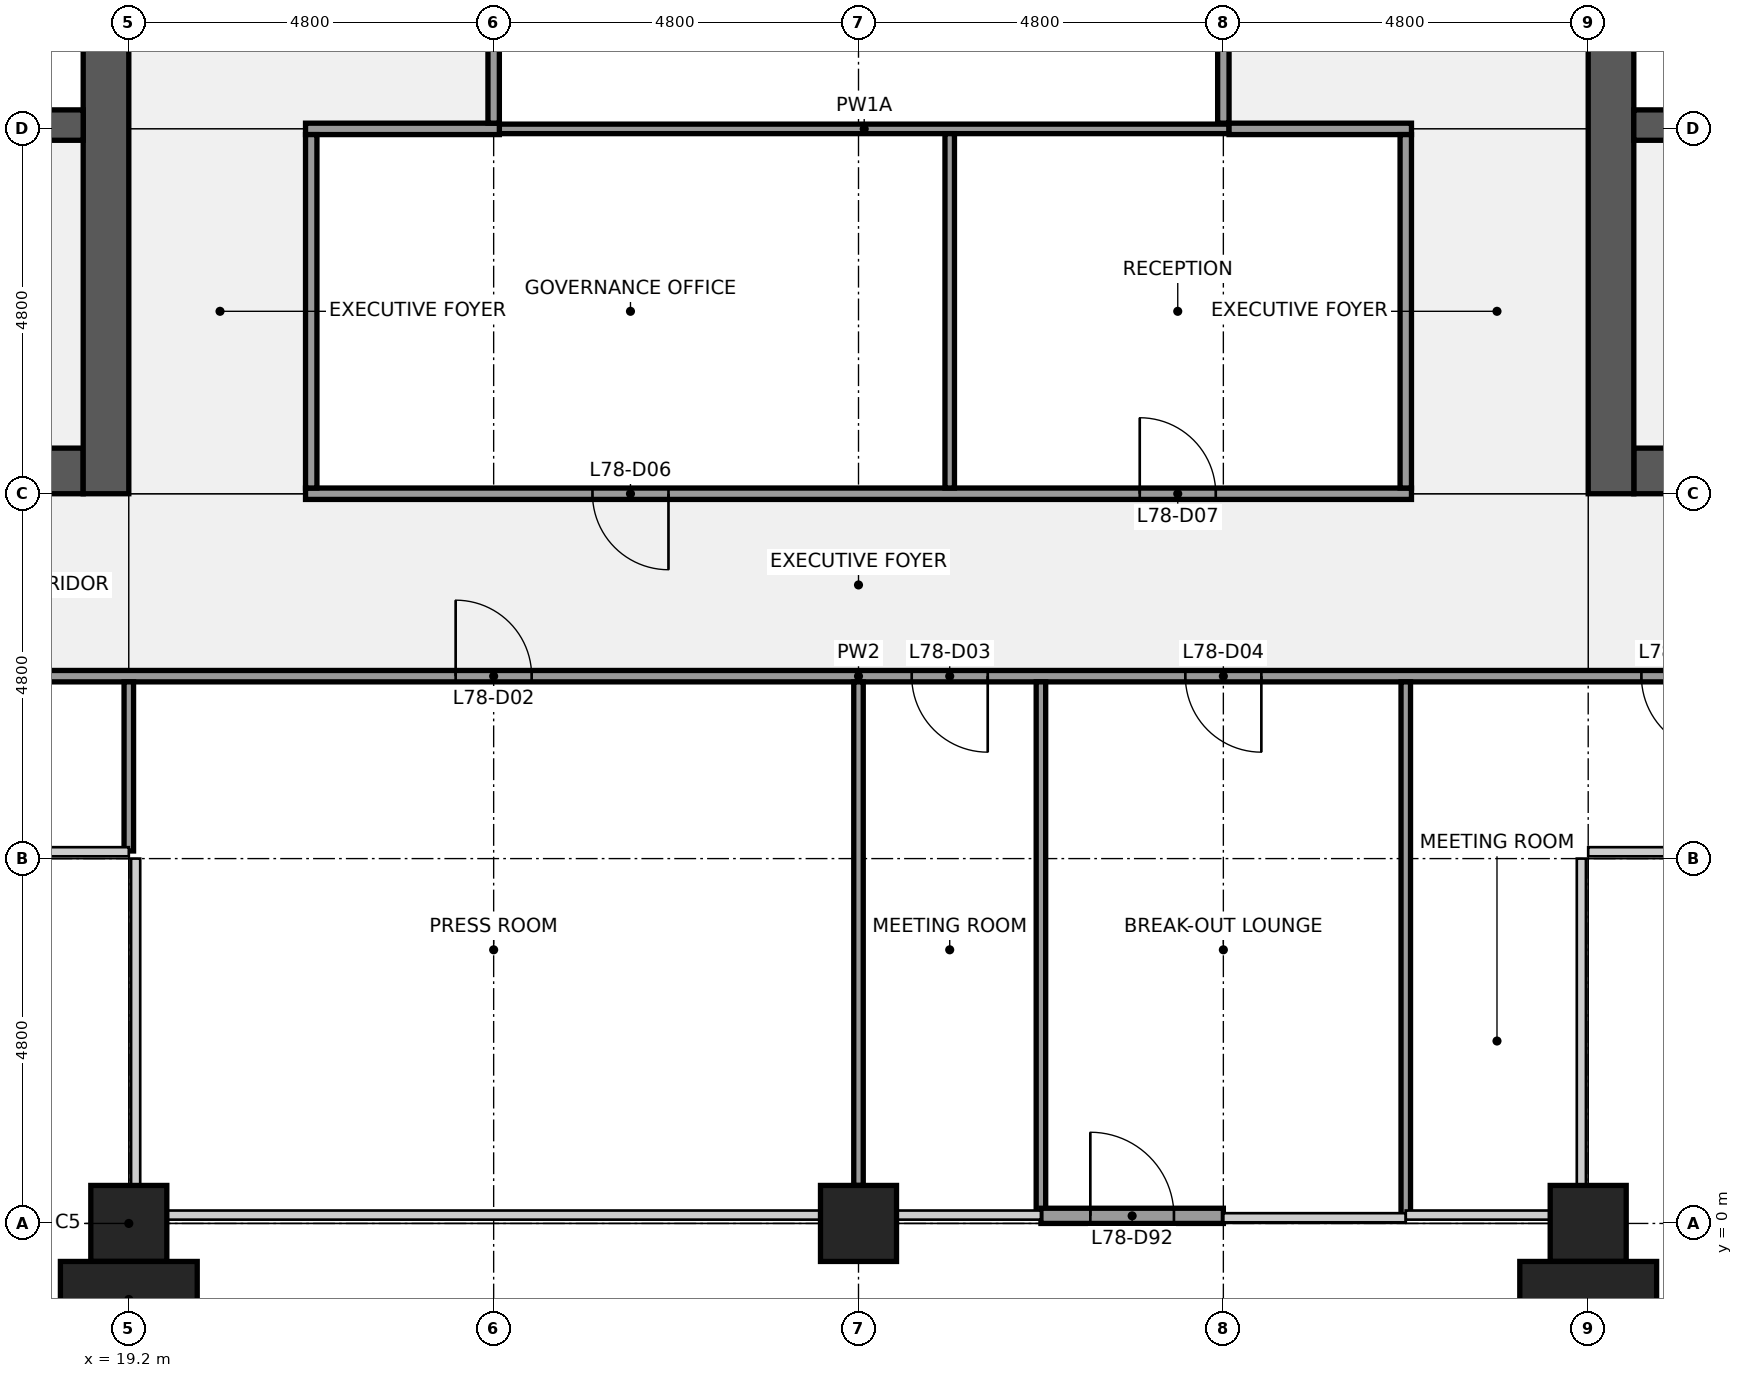
"""IFC4 building model, lengths in metres.
Left out: names, types, materials, properties, quantities, classifications, styles, units other than length and angle.
Written with IfcOpenShell. Run it as: python <this file> out.ifc"""

import sys

from ifc_helpers import new_model, si_unit, direction, frame, frame_2d, origin, origin_2d, place, context, subcontext, project, spatial, rectangle, extrude, element, fill, save


model = new_model("IFC4")
c1 = context("Model", 3, precision=1e-05, world=origin(), true_north=direction((0.0, 1.0)))
c2 = subcontext(c1, "Body", "Model", "MODEL_VIEW")
j1 = project(units=[si_unit("LENGTHUNIT", "METRE"), si_unit("PLANEANGLEUNIT", "RADIAN")], contexts=[c1])
p1 = place(None, origin())
s1 = spatial("IfcSite", under=j1, at=p1, CompositionType="ELEMENT")
p2 = place(p1, origin())
s2 = spatial("IfcBuilding", under=s1, at=p2, CompositionType="ELEMENT")
p3 = place(p2, frame((0.0, 0.0, 350.3)))
s3 = spatial("IfcBuildingStorey", under=s2, at=p3, CompositionType="ELEMENT", Elevation=350.3)
for number, where, z_axis, x_axis in (
    (1, (19.2, 0.0, 0.0), (0.0, 0.0, 1.0), (1.0, 0.0, 0.0)),
    (2, (28.8, 0.0, 0.0), (0.0, 0.0, 1.0), (1.0, 0.0, 0.0)),
    (3, (38.4, 0.0, 0.0), (0.0, 0.0, 1.0), (1.0, 0.0, 0.0)),
):
    element("IfcColumn", number, at=place(p3, frame(where, z_axis=z_axis, x_axis=x_axis)), inside=s3, PredefinedType="COLUMN", context=c2, shape_type="SweptSolid", body=[
        extrude(rectangle(XDim=1.0, YDim=1.0, at=origin_2d()), origin(), (0.0, 0.0, 1.0), 4.0),
    ])
p4 = place(p3, frame((18.6, 9.9, 0.0), z_axis=(0.0, 0.0, 1.0), x_axis=(-1.0, 0.0, 0.0)))
e4 = element("IfcWall", 4, at=p4, inside=s3, PredefinedType="SHEAR", context=c2, shape_type="SweptSolid", body=[
    extrude(rectangle(XDim=4.2, YDim=0.6, at=frame_2d((2.1, 0.0))), origin(), (0.0, 0.0, 1.0), 3.75),
])
p5 = place(p4, frame((1.25, 0.0, 0.0)))
e5 = element("IfcOpeningElement", 5, at=p5, cuts=e4, PredefinedType="OPENING", context=c2, shape_type="SweptSolid", body=[
    extrude(rectangle(XDim=1.1, YDim=2.1, at=frame_2d((0.55, 1.05))), frame((0.0, 0.31, 0.0), z_axis=(0.0, -1.0, 0.0), x_axis=(1.0, 0.0, 0.0)), (0.0, 0.0, 1.0), 0.62),
])
p6 = place(p3, frame((18.9, 38.4, 0.0), z_axis=(0.0, 0.0, 1.0), x_axis=(0.0, -1.0, 0.0)))
e6 = element("IfcWall", 6, at=p6, inside=s3, PredefinedType="SHEAR", context=c2, shape_type="SweptSolid", body=[
    extrude(rectangle(XDim=28.8, YDim=0.6, at=frame_2d((14.4, 0.0))), origin(), (0.0, 0.0, 1.0), 3.75),
])
p7 = place(p6, frame((18.3, 0.0, 0.0)))
e7 = element("IfcOpeningElement", 7, at=p7, cuts=e6, PredefinedType="OPENING", context=c2, shape_type="SweptSolid", body=[
    extrude(rectangle(XDim=1.8, YDim=2.1, at=frame_2d((0.9, 1.05))), frame((0.0, 0.31, 0.0), z_axis=(0.0, -1.0, 0.0), x_axis=(1.0, 0.0, 0.0)), (0.0, 0.0, 1.0), 0.62),
])
p8 = place(p6, frame((8.7, 0.0, 0.0)))
e8 = element("IfcOpeningElement", 8, at=p8, cuts=e6, PredefinedType="OPENING", context=c2, shape_type="SweptSolid", body=[
    extrude(rectangle(XDim=1.8, YDim=2.1, at=frame_2d((0.9, 1.05))), frame((0.0, 0.31, 0.0), z_axis=(0.0, -1.0, 0.0), x_axis=(1.0, 0.0, 0.0)), (0.0, 0.0, 1.0), 0.62),
])
p9 = place(p3, frame((0.6, 14.45, 0.0), z_axis=(0.0, 0.0, 1.0), x_axis=(1.0, 0.0, 0.0)))
e9 = element("IfcWall", 9, at=p9, inside=s3, PredefinedType="SHEAR", context=c2, shape_type="SweptSolid", body=[
    extrude(rectangle(XDim=18.0, YDim=0.4, at=frame_2d((9.0, 0.0))), origin(), (0.0, 0.0, 1.0), 3.75),
])
p10 = place(p3, frame((43.2, 9.9, 0.0), z_axis=(0.0, 0.0, 1.0), x_axis=(-1.0, 0.0, 0.0)))
e10 = element("IfcWall", 10, at=p10, inside=s3, PredefinedType="SHEAR", context=c2, shape_type="SweptSolid", body=[
    extrude(rectangle(XDim=4.2, YDim=0.6, at=frame_2d((2.1, 0.0))), origin(), (0.0, 0.0, 1.0), 3.75),
])
p11 = place(p10, frame((1.85, 0.0, 0.0)))
e11 = element("IfcOpeningElement", 11, at=p11, cuts=e10, PredefinedType="OPENING", context=c2, shape_type="SweptSolid", body=[
    extrude(rectangle(XDim=1.1, YDim=2.1, at=frame_2d((0.55, 1.05))), frame((0.0, 0.31, 0.0), z_axis=(0.0, -1.0, 0.0), x_axis=(1.0, 0.0, 0.0)), (0.0, 0.0, 1.0), 0.62),
])
p12 = place(p3, frame((38.7, 9.6, 0.0), z_axis=(0.0, 0.0, 1.0), x_axis=(0.0, 1.0, 0.0)))
e12 = element("IfcWall", 12, at=p12, inside=s3, PredefinedType="SHEAR", context=c2, shape_type="SweptSolid", body=[
    extrude(rectangle(XDim=28.8, YDim=0.6, at=frame_2d((14.4, 0.0))), origin(), (0.0, 0.0, 1.0), 3.75),
])
p13 = place(p12, frame((8.7, 0.0, 0.0)))
e13 = element("IfcOpeningElement", 13, at=p13, cuts=e12, PredefinedType="OPENING", context=c2, shape_type="SweptSolid", body=[
    extrude(rectangle(XDim=1.8, YDim=2.1, at=frame_2d((0.9, 1.05))), frame((0.0, 0.31, 0.0), z_axis=(0.0, -1.0, 0.0), x_axis=(1.0, 0.0, 0.0)), (0.0, 0.0, 1.0), 0.62),
])
p14 = place(p12, frame((18.3, 0.0, 0.0)))
e14 = element("IfcOpeningElement", 14, at=p14, cuts=e12, PredefinedType="OPENING", context=c2, shape_type="SweptSolid", body=[
    extrude(rectangle(XDim=1.8, YDim=2.1, at=frame_2d((0.9, 1.05))), frame((0.0, 0.31, 0.0), z_axis=(0.0, -1.0, 0.0), x_axis=(1.0, 0.0, 0.0)), (0.0, 0.0, 1.0), 0.62),
])
p15 = place(p3, frame((39.0, 14.45, 0.0), z_axis=(0.0, 0.0, 1.0), x_axis=(1.0, 0.0, 0.0)))
e15 = element("IfcWall", 15, at=p15, inside=s3, PredefinedType="SHEAR", context=c2, shape_type="SweptSolid", body=[
    extrude(rectangle(XDim=18.0, YDim=0.4, at=frame_2d((9.0, 0.0))), origin(), (0.0, 0.0, 1.0), 3.75),
])
p16 = place(p3, frame((14.5, 7.2, 0.0), z_axis=(0.0, 0.0, 1.0), x_axis=(1.0, 0.0, 0.0)))
e16 = element("IfcWall", 16, at=p16, inside=s3, PredefinedType="PARTITIONING", context=c2, shape_type="SweptSolid", body=[
    extrude(rectangle(XDim=28.6, YDim=0.15, at=frame_2d((14.3, 0.0))), origin(), (0.0, 0.0, 1.0), 2.759),
])
p17 = place(p16, frame((1.85, 0.0, 0.0)))
e17 = element("IfcOpeningElement", 17, at=p17, cuts=e16, PredefinedType="OPENING", context=c2, shape_type="SweptSolid", body=[
    extrude(rectangle(XDim=1.0, YDim=2.1, at=frame_2d((0.5, 1.05))), frame((0.0, 0.085, 0.0), z_axis=(0.0, -1.0, 0.0), x_axis=(1.0, 0.0, 0.0)), (0.0, 0.0, 1.0), 0.17),
])
p18 = place(p16, frame((9.0, 0.0, 0.0)))
e18 = element("IfcOpeningElement", 18, at=p18, cuts=e16, PredefinedType="OPENING", context=c2, shape_type="SweptSolid", body=[
    extrude(rectangle(XDim=1.0, YDim=2.1, at=frame_2d((0.5, 1.05))), frame((0.0, 0.085, 0.0), z_axis=(0.0, -1.0, 0.0), x_axis=(1.0, 0.0, 0.0)), (0.0, 0.0, 1.0), 0.17),
])
p19 = place(p16, frame((15.0, 0.0, 0.0)))
e19 = element("IfcOpeningElement", 19, at=p19, cuts=e16, PredefinedType="OPENING", context=c2, shape_type="SweptSolid", body=[
    extrude(rectangle(XDim=1.0, YDim=2.1, at=frame_2d((0.5, 1.05))), frame((0.0, 0.085, 0.0), z_axis=(0.0, -1.0, 0.0), x_axis=(1.0, 0.0, 0.0)), (0.0, 0.0, 1.0), 0.17),
])
p20 = place(p16, frame((18.6, 0.0, 0.0)))
e20 = element("IfcOpeningElement", 20, at=p20, cuts=e16, PredefinedType="OPENING", context=c2, shape_type="SweptSolid", body=[
    extrude(rectangle(XDim=1.0, YDim=2.1, at=frame_2d((0.5, 1.05))), frame((0.0, 0.085, 0.0), z_axis=(0.0, -1.0, 0.0), x_axis=(1.0, 0.0, 0.0)), (0.0, 0.0, 1.0), 0.17),
])
p21 = place(p16, frame((24.6, 0.0, 0.0)))
e21 = element("IfcOpeningElement", 21, at=p21, cuts=e16, PredefinedType="OPENING", context=c2, shape_type="SweptSolid", body=[
    extrude(rectangle(XDim=1.0, YDim=2.1, at=frame_2d((0.5, 1.05))), frame((0.0, 0.085, 0.0), z_axis=(0.0, -1.0, 0.0), x_axis=(1.0, 0.0, 0.0)), (0.0, 0.0, 1.0), 0.17),
])
p22 = place(p3, frame((21.525, 9.6, 0.0), z_axis=(0.0, 0.0, 1.0), x_axis=(1.0, 0.0, 0.0)))
e22 = element("IfcWall", 22, at=p22, inside=s3, PredefinedType="PARTITIONING", context=c2, shape_type="SweptSolid", body=[
    extrude(rectangle(XDim=14.55, YDim=0.15, at=frame_2d((7.275, 0.0))), origin(), (0.0, 0.0, 1.0), 2.759),
])
p23 = place(p22, frame((3.775, 0.0, 0.0)))
e23 = element("IfcOpeningElement", 23, at=p23, cuts=e22, PredefinedType="OPENING", context=c2, shape_type="SweptSolid", body=[
    extrude(rectangle(XDim=1.0, YDim=2.1, at=frame_2d((0.5, 1.05))), frame((0.0, 0.085, 0.0), z_axis=(0.0, -1.0, 0.0), x_axis=(1.0, 0.0, 0.0)), (0.0, 0.0, 1.0), 0.17),
])
p24 = place(p22, frame((10.975, 0.0, 0.0)))
e24 = element("IfcOpeningElement", 24, at=p24, cuts=e22, PredefinedType="OPENING", context=c2, shape_type="SweptSolid", body=[
    extrude(rectangle(XDim=1.0, YDim=2.1, at=frame_2d((0.5, 1.05))), frame((0.0, 0.085, 0.0), z_axis=(0.0, -1.0, 0.0), x_axis=(1.0, 0.0, 0.0)), (0.0, 0.0, 1.0), 0.17),
])
p25 = place(p3, frame((24.075, 14.4, 0.0), z_axis=(0.0, 0.0, 1.0), x_axis=(1.0, 0.0, 0.0)))
e25 = element("IfcWall", 25, at=p25, inside=s3, PredefinedType="PARTITIONING", context=c2, shape_type="SweptSolid", body=[
    extrude(rectangle(XDim=9.6, YDim=0.125, at=frame_2d((4.8, 0.0))), origin(), (0.0, 0.0, 1.0), 2.759),
])
p26 = place(p3, frame((21.525, 14.4, 0.0), z_axis=(0.0, 0.0, 1.0), x_axis=(1.0, 0.0, 0.0)))
e26 = element("IfcWall", 26, at=p26, inside=s3, PredefinedType="PARTITIONING", context=c2, shape_type="SweptSolid", body=[
    extrude(rectangle(XDim=2.55, YDim=0.15, at=frame_2d((1.275, 0.0))), origin(), (0.0, 0.0, 1.0), 2.759),
])
p27 = place(p3, frame((33.675, 14.4, 0.0), z_axis=(0.0, 0.0, 1.0), x_axis=(1.0, 0.0, 0.0)))
e27 = element("IfcWall", 27, at=p27, inside=s3, PredefinedType="PARTITIONING", context=c2, shape_type="SweptSolid", body=[
    extrude(rectangle(XDim=2.4, YDim=0.15, at=frame_2d((1.2, 0.0))), origin(), (0.0, 0.0, 1.0), 2.759),
])
p28 = place(p3, frame((19.2, 4.9, 0.0), z_axis=(0.0, 0.0, 1.0), x_axis=(0.0, 1.0, 0.0)))
e28 = element("IfcWall", 28, at=p28, inside=s3, PredefinedType="PARTITIONING", context=c2, shape_type="SweptSolid", body=[
    extrude(rectangle(XDim=2.225, YDim=0.125, at=frame_2d((1.113, 0.0))), origin(), (0.0, 0.0, 1.0), 2.759),
])
p29 = place(p3, frame((21.6, 9.675, 0.0), z_axis=(0.0, 0.0, 1.0), x_axis=(0.0, 1.0, 0.0)))
e29 = element("IfcWall", 29, at=p29, inside=s3, PredefinedType="PARTITIONING", context=c2, shape_type="SweptSolid", body=[
    extrude(rectangle(XDim=4.65, YDim=0.15, at=frame_2d((2.325, 0.0))), origin(), (0.0, 0.0, 1.0), 2.759),
])
p30 = place(p3, frame((24.0, 14.475, 0.0), z_axis=(0.0, 0.0, 1.0), x_axis=(0.0, 1.0, 0.0)))
e30 = element("IfcWall", 30, at=p30, inside=s3, PredefinedType="PARTITIONING", context=c2, shape_type="SweptSolid", body=[
    extrude(rectangle(XDim=5.85, YDim=0.15, at=frame_2d((2.925, 0.0))), origin(), (0.0, 0.0, 1.0), 2.759),
])
p31 = place(p3, frame((28.8, 0.5, 0.0), z_axis=(0.0, 0.0, 1.0), x_axis=(0.0, 1.0, 0.0)))
e31 = element("IfcWall", 31, at=p31, inside=s3, PredefinedType="PARTITIONING", context=c2, shape_type="SweptSolid", body=[
    extrude(rectangle(XDim=6.625, YDim=0.125, at=frame_2d((3.312, 0.0))), origin(), (0.0, 0.0, 1.0), 2.759),
])
p32 = place(p3, frame((30.0, 9.675, 0.0), z_axis=(0.0, 0.0, 1.0), x_axis=(0.0, 1.0, 0.0)))
e32 = element("IfcWall", 32, at=p32, inside=s3, PredefinedType="PARTITIONING", context=c2, shape_type="SweptSolid", body=[
    extrude(rectangle(XDim=4.662, YDim=0.125, at=frame_2d((2.331, 0.0))), origin(), (0.0, 0.0, 1.0), 2.759),
])
p33 = place(p3, frame((31.2, 0.1, 0.0), z_axis=(0.0, 0.0, 1.0), x_axis=(0.0, 1.0, 0.0)))
e33 = element("IfcWall", 33, at=p33, inside=s3, PredefinedType="PARTITIONING", context=c2, shape_type="SweptSolid", body=[
    extrude(rectangle(XDim=7.025, YDim=0.125, at=frame_2d((3.512, 0.0))), origin(), (0.0, 0.0, 1.0), 2.759),
])
p34 = place(p3, frame((33.6, 14.475, 0.0), z_axis=(0.0, 0.0, 1.0), x_axis=(0.0, 1.0, 0.0)))
e34 = element("IfcWall", 34, at=p34, inside=s3, PredefinedType="PARTITIONING", context=c2, shape_type="SweptSolid", body=[
    extrude(rectangle(XDim=5.85, YDim=0.15, at=frame_2d((2.925, 0.0))), origin(), (0.0, 0.0, 1.0), 2.759),
])
p35 = place(p3, frame((36.0, 0.1, 0.0), z_axis=(0.0, 0.0, 1.0), x_axis=(0.0, 1.0, 0.0)))
e35 = element("IfcWall", 35, at=p35, inside=s3, PredefinedType="PARTITIONING", context=c2, shape_type="SweptSolid", body=[
    extrude(rectangle(XDim=7.025, YDim=0.125, at=frame_2d((3.512, 0.0))), origin(), (0.0, 0.0, 1.0), 2.759),
])
p36 = place(p3, frame((36.0, 9.675, 0.0), z_axis=(0.0, 0.0, 1.0), x_axis=(0.0, 1.0, 0.0)))
e36 = element("IfcWall", 36, at=p36, inside=s3, PredefinedType="PARTITIONING", context=c2, shape_type="SweptSolid", body=[
    extrude(rectangle(XDim=4.65, YDim=0.15, at=frame_2d((2.325, 0.0))), origin(), (0.0, 0.0, 1.0), 2.759),
])
p37 = place(p3, frame((31.2, 0.1, 0.0), z_axis=(0.0, 0.0, 1.0), x_axis=(1.0, 0.0, 0.0)))
e37 = element("IfcWall", 37, at=p37, inside=s3, PredefinedType="SOLIDWALL", context=c2, shape_type="SweptSolid", body=[
    extrude(rectangle(XDim=2.4, YDim=0.2, at=frame_2d((1.2, 0.0))), origin(), (0.0, 0.0, 1.0), 3.15),
])
p38 = place(p37, frame((0.65, 0.0, 0.0)))
e38 = element("IfcOpeningElement", 38, at=p38, cuts=e37, PredefinedType="OPENING", context=c2, shape_type="SweptSolid", body=[
    extrude(rectangle(XDim=1.1, YDim=2.1, at=frame_2d((0.55, 1.05))), frame((0.0, 0.11, 0.0), z_axis=(0.0, -1.0, 0.0), x_axis=(1.0, 0.0, 0.0)), (0.0, 0.0, 1.0), 0.22),
])
for number, where, z_axis, x_axis in (
    (39, (19.2, -1.0, 0.0), (0.0, 0.0, 1.0), (1.0, 0.0, 0.0)),
    (40, (38.4, -1.0, 0.0), (0.0, 0.0, 1.0), (1.0, 0.0, 0.0)),
):
    element("IfcColumn", number, at=place(p3, frame(where, z_axis=z_axis, x_axis=x_axis)), inside=s3, PredefinedType="PILASTER", context=c2, shape_type="SweptSolid", body=[
        extrude(rectangle(XDim=1.8, YDim=1.0, at=origin_2d()), origin(), (0.0, 0.0, 1.0), 4.0),
    ])
p39 = place(p18, origin())
e41 = element("IfcDoor", 41, at=p39, inside=s3, OperationType="SINGLE_SWING_LEFT", PredefinedType="DOOR", context=c2, shape_type="SweptSolid", body=[
    extrude(rectangle(XDim=1.0, YDim=2.1, at=frame_2d((0.5, 1.05))), frame((0.0, 0.025, 0.0), z_axis=(0.0, -1.0, 0.0), x_axis=(1.0, 0.0, 0.0)), (0.0, 0.0, 1.0), 0.05),
])
fill(e18, e41)
p40 = place(p19, origin())
e42 = element("IfcDoor", 42, at=p40, inside=s3, OperationType="SINGLE_SWING_RIGHT", PredefinedType="DOOR", context=c2, shape_type="SweptSolid", body=[
    extrude(rectangle(XDim=1.0, YDim=2.1, at=frame_2d((0.5, 1.05))), frame((0.0, 0.025, 0.0), z_axis=(0.0, -1.0, 0.0), x_axis=(1.0, 0.0, 0.0)), (0.0, 0.0, 1.0), 0.05),
])
fill(e19, e42)
p41 = place(p20, origin())
e43 = element("IfcDoor", 43, at=p41, inside=s3, OperationType="SINGLE_SWING_RIGHT", PredefinedType="DOOR", context=c2, shape_type="SweptSolid", body=[
    extrude(rectangle(XDim=1.0, YDim=2.1, at=frame_2d((0.5, 1.05))), frame((0.0, 0.025, 0.0), z_axis=(0.0, -1.0, 0.0), x_axis=(1.0, 0.0, 0.0)), (0.0, 0.0, 1.0), 0.05),
])
fill(e20, e43)
p42 = place(p21, origin())
e44 = element("IfcDoor", 44, at=p42, inside=s3, OperationType="SINGLE_SWING_RIGHT", PredefinedType="DOOR", context=c2, shape_type="SweptSolid", body=[
    extrude(rectangle(XDim=1.0, YDim=2.1, at=frame_2d((0.5, 1.05))), frame((0.0, 0.025, 0.0), z_axis=(0.0, -1.0, 0.0), x_axis=(1.0, 0.0, 0.0)), (0.0, 0.0, 1.0), 0.05),
])
fill(e21, e44)
p43 = place(p23, origin())
e45 = element("IfcDoor", 45, at=p43, inside=s3, OperationType="SINGLE_SWING_RIGHT", PredefinedType="DOOR", context=c2, shape_type="SweptSolid", body=[
    extrude(rectangle(XDim=1.0, YDim=2.1, at=frame_2d((0.5, 1.05))), frame((0.0, 0.025, 0.0), z_axis=(0.0, -1.0, 0.0), x_axis=(1.0, 0.0, 0.0)), (0.0, 0.0, 1.0), 0.05),
])
fill(e23, e45)
p44 = place(p24, origin())
e46 = element("IfcDoor", 46, at=p44, inside=s3, OperationType="SINGLE_SWING_LEFT", PredefinedType="DOOR", context=c2, shape_type="SweptSolid", body=[
    extrude(rectangle(XDim=1.0, YDim=2.1, at=frame_2d((0.5, 1.05))), frame((0.0, 0.025, 0.0), z_axis=(0.0, -1.0, 0.0), x_axis=(1.0, 0.0, 0.0)), (0.0, 0.0, 1.0), 0.05),
])
fill(e24, e46)
p45 = place(p38, origin())
e47 = element("IfcDoor", 47, at=p45, inside=s3, OperationType="SINGLE_SWING_LEFT", PredefinedType="DOOR", context=c2, shape_type="SweptSolid", body=[
    extrude(rectangle(XDim=1.1, YDim=2.1, at=frame_2d((0.55, 1.05))), frame((0.0, 0.025, 0.0), z_axis=(0.0, -1.0, 0.0), x_axis=(1.0, 0.0, 0.0)), (0.0, 0.0, 1.0), 0.05),
])
fill(e38, e47)
save(model, sys.argv[1])
